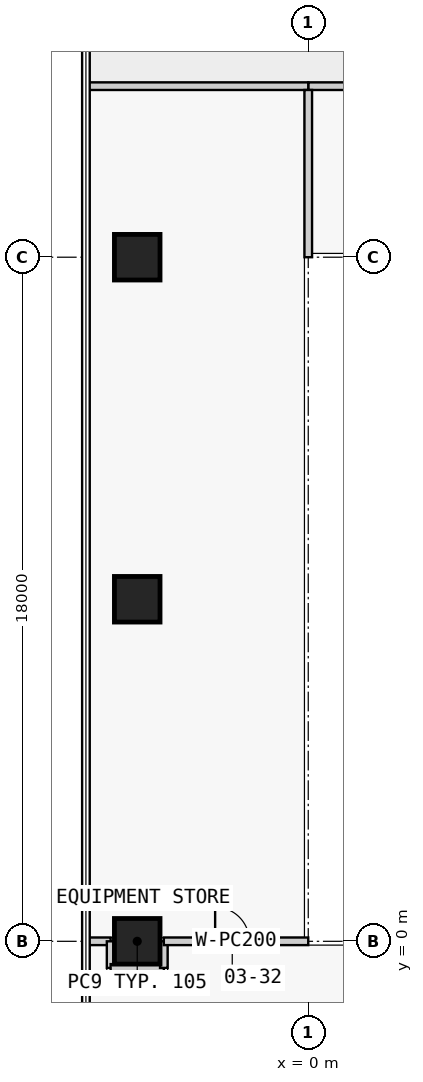
"""IFC4 building model, lengths in metres.
Left out: names, types, materials, properties, quantities, classifications, styles, units other than length and angle.
Written with IfcOpenShell. Run it as: python <this file> out.ifc"""

import sys

from ifc_helpers import new_model, si_unit, direction, frame, frame_2d, origin, origin_2d, place, context, subcontext, project, spatial, rectangle, extrude, element, fill, save


model = new_model("IFC4")
c1 = context("Model", 3, precision=1e-05, world=origin(), true_north=direction((0.0, 1.0)))
c2 = subcontext(c1, "Body", "Model", "MODEL_VIEW")
j1 = project(units=[si_unit("LENGTHUNIT", "METRE"), si_unit("PLANEANGLEUNIT", "RADIAN")], contexts=[c1])
p1 = place(None, origin())
s1 = spatial("IfcSite", under=j1, at=p1, CompositionType="ELEMENT")
p2 = place(p1, origin())
s2 = spatial("IfcBuilding", under=s1, at=p2, CompositionType="ELEMENT")
p3 = place(p2, frame((0.0, 0.0, 17.3)))
s3 = spatial("IfcBuildingStorey", under=s2, at=p3, CompositionType="ELEMENT", Elevation=17.3)
for number, where, z_axis, x_axis in (
    (1, (-4.5, 0.0, 0.0), (0.0, 0.0, 1.0), (1.0, 0.0, 0.0)),
    (2, (-4.5, 9.0, 0.0), (0.0, 0.0, 1.0), (1.0, 0.0, 0.0)),
    (3, (-4.5, 18.0, 0.0), (0.0, 0.0, 1.0), (1.0, 0.0, 0.0)),
):
    element("IfcColumn", number, at=place(p3, frame(where, z_axis=z_axis, x_axis=x_axis)), inside=s3, PredefinedType="COLUMN", context=c2, shape_type="SweptSolid", body=[
        extrude(rectangle(XDim=1.2, YDim=1.2, at=origin_2d()), origin(), (0.0, 0.0, 1.0), 4.5),
    ])
p4 = place(p3, frame((0.0, 22.5, 0.0), z_axis=(0.0, 0.0, 1.0), x_axis=(1.0, 0.0, 0.0)))
e4 = element("IfcWall", 4, at=p4, inside=s3, PredefinedType="PARTITIONING", context=c2, shape_type="SweptSolid", body=[
    extrude(rectangle(XDim=22.5, YDim=0.2, at=frame_2d((11.25, 0.0))), origin(), (0.0, 0.0, 1.0), 4.15),
])
p5 = place(p4, frame((10.35, 0.0, 0.0)))
e5 = element("IfcOpeningElement", 5, at=p5, cuts=e4, PredefinedType="OPENING", context=c2, shape_type="SweptSolid", body=[
    extrude(rectangle(XDim=1.8, YDim=2.1, at=frame_2d((0.9, 1.05))), frame((0.0, 0.11, 0.0), z_axis=(0.0, -1.0, 0.0), x_axis=(1.0, 0.0, 0.0)), (0.0, 0.0, 1.0), 0.22),
])
p6 = place(p3, frame((-5.85, 0.0, 0.0), z_axis=(0.0, 0.0, 1.0), x_axis=(1.0, 0.0, 0.0)))
e6 = element("IfcWall", 6, at=p6, inside=s3, PredefinedType="PARTITIONING", context=c2, shape_type="SweptSolid", body=[
    extrude(rectangle(XDim=0.65, YDim=0.2, at=frame_2d((0.325, 0.0))), origin(), (0.0, 0.0, 1.0), 4.15),
])
p7 = place(p3, frame((-5.2, 0.0, 0.0), z_axis=(0.0, 0.0, 1.0), x_axis=(0.0, -1.0, 0.0)))
e7 = element("IfcWall", 7, at=p7, inside=s3, PredefinedType="PARTITIONING", context=c2, shape_type="SweptSolid", body=[
    extrude(rectangle(XDim=0.7, YDim=0.2, at=frame_2d((0.35, 0.0))), origin(), (0.0, 0.0, 1.0), 4.15),
])
p8 = place(p3, frame((-5.2, -0.7, 0.0), z_axis=(0.0, 0.0, 1.0), x_axis=(1.0, 0.0, 0.0)))
e8 = element("IfcWall", 8, at=p8, inside=s3, PredefinedType="PARTITIONING", context=c2, shape_type="SweptSolid", body=[
    extrude(rectangle(XDim=1.4, YDim=0.2, at=frame_2d((0.7, 0.0))), origin(), (0.0, 0.0, 1.0), 4.15),
])
p9 = place(p3, frame((-3.8, -0.7, 0.0), z_axis=(0.0, 0.0, 1.0), x_axis=(0.0, 1.0, 0.0)))
e9 = element("IfcWall", 9, at=p9, inside=s3, PredefinedType="PARTITIONING", context=c2, shape_type="SweptSolid", body=[
    extrude(rectangle(XDim=0.7, YDim=0.2, at=frame_2d((0.35, 0.0))), origin(), (0.0, 0.0, 1.0), 4.15),
])
p10 = place(p3, frame((-3.8, 0.0, 0.0), z_axis=(0.0, 0.0, 1.0), x_axis=(1.0, 0.0, 0.0)))
e10 = element("IfcWall", 10, at=p10, inside=s3, PredefinedType="PARTITIONING", context=c2, shape_type="SweptSolid", body=[
    extrude(rectangle(XDim=3.8, YDim=0.2, at=frame_2d((1.9, 0.0))), origin(), (0.0, 0.0, 1.0), 4.15),
])
p11 = place(p10, frame((1.35, 0.0, 0.0)))
e11 = element("IfcOpeningElement", 11, at=p11, cuts=e10, PredefinedType="OPENING", context=c2, shape_type="SweptSolid", body=[
    extrude(rectangle(XDim=0.9, YDim=2.1, at=frame_2d((0.45, 1.05))), frame((0.0, 0.11, 0.0), z_axis=(0.0, -1.0, 0.0), x_axis=(1.0, 0.0, 0.0)), (0.0, 0.0, 1.0), 0.22),
])
p12 = place(p3, frame((0.0, 22.5, 0.0), z_axis=(0.0, 0.0, 1.0), x_axis=(-1.0, 0.0, 0.0)))
e12 = element("IfcWall", 12, at=p12, inside=s3, PredefinedType="PARTITIONING", context=c2, shape_type="SweptSolid", body=[
    extrude(rectangle(XDim=5.85, YDim=0.2, at=frame_2d((2.925, 0.0))), origin(), (0.0, 0.0, 1.0), 4.15),
])
p13 = place(p3, frame((0.0, 18.0, 0.0), z_axis=(0.0, 0.0, 1.0), x_axis=(0.0, 1.0, 0.0)))
e13 = element("IfcWall", 13, at=p13, inside=s3, PredefinedType="PARTITIONING", context=c2, shape_type="SweptSolid", body=[
    extrude(rectangle(XDim=4.4, YDim=0.2, at=frame_2d((2.2, 0.0))), origin(), (0.0, 0.0, 1.0), 4.15),
])
p14 = place(p11, origin())
e14 = element("IfcDoor", 14, at=p14, inside=s3, OperationType="SINGLE_SWING_LEFT", PredefinedType="DOOR", context=c2, shape_type="SweptSolid", body=[
    extrude(rectangle(XDim=0.9, YDim=2.1, at=frame_2d((0.45, 1.05))), frame((0.0, 0.025, 0.0), z_axis=(0.0, -1.0, 0.0), x_axis=(1.0, 0.0, 0.0)), (0.0, 0.0, 1.0), 0.05),
])
fill(e11, e14)
save(model, sys.argv[1])
